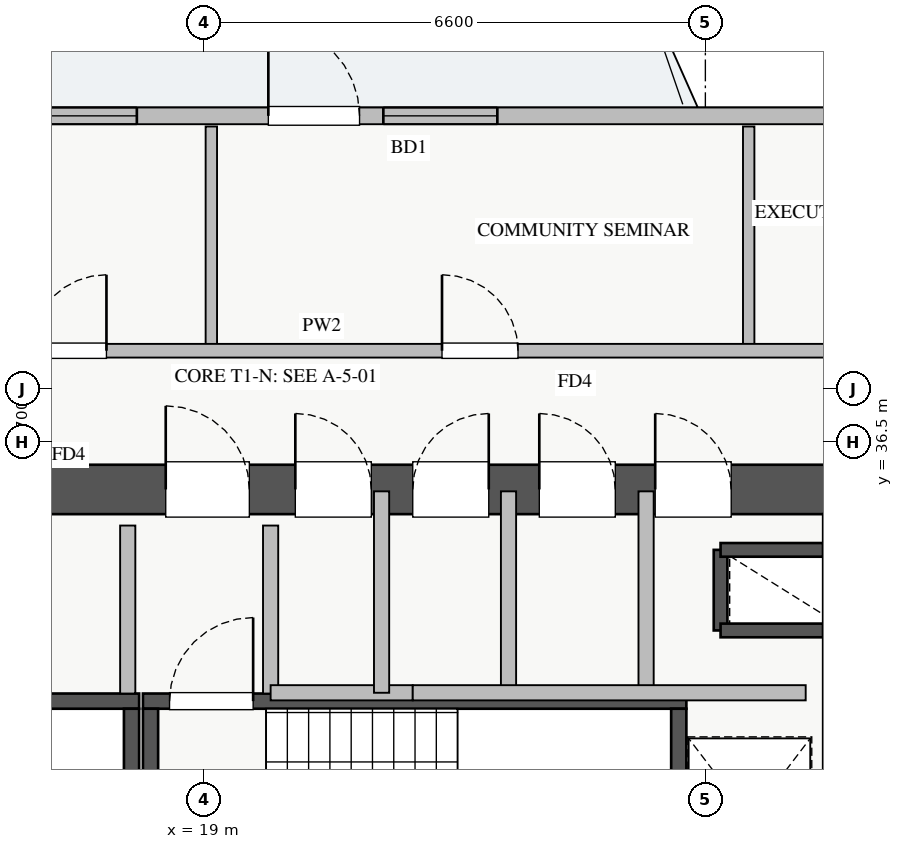
"""IFC4 building model, lengths in metres.
Left out: names, types, materials, properties, quantities, classifications, styles, units other than length and angle.
Written with IfcOpenShell. Run it as: python <this file> out.ifc"""

import sys

from ifc_helpers import new_model, si_unit, direction, frame, frame_2d, origin, place, context, subcontext, project, spatial, rectangle, extrude, source, transform, mapped, element, fill, save


model = new_model("IFC4")
c1 = context("Model", 3, precision=1e-05, world=origin(), true_north=direction((0.0, 1.0)))
c2 = subcontext(c1, "Body", "Model", "MODEL_VIEW")
j1 = project(units=[si_unit("LENGTHUNIT", "METRE"), si_unit("PLANEANGLEUNIT", "RADIAN")], contexts=[c1])
p1 = place(None, origin())
s1 = spatial("IfcSite", under=j1, at=p1, CompositionType="ELEMENT")
p2 = place(p1, origin())
s2 = spatial("IfcBuilding", under=s1, at=p2, CompositionType="ELEMENT")
p3 = place(p2, frame((0.0, 0.0, 143.75)))
s3 = spatial("IfcBuildingStorey", under=s2, at=p3, CompositionType="ELEMENT", Elevation=143.75)
p4 = place(p3, frame((25.8, 34.02, 0.0), z_axis=(0.0, 0.0, 1.0), x_axis=(0.0, 1.0, 0.0)))
e1 = element("IfcWall", 1, at=p4, inside=s3, PredefinedType="SHEAR", context=c2, shape_type="SweptSolid", body=[
    extrude(rectangle(XDim=1.06, YDim=0.18, at=frame_2d((0.53, 0.0))), origin(), (0.0, 0.0, 1.0), 3.07),
])
for number, where, z_axis, x_axis in (
    (2, (25.8, 35.08, 0.0), (0.0, 0.0, 1.0), (1.0, 0.0, 0.0)),
    (3, (25.8, 34.02, 0.0), (0.0, 0.0, 1.0), (1.0, 0.0, 0.0)),
):
    element("IfcWall", number, at=place(p3, frame(where, z_axis=z_axis, x_axis=x_axis)), inside=s3, PredefinedType="SHEAR", context=c2, shape_type="SweptSolid", body=[
        extrude(rectangle(XDim=1.35, YDim=0.18, at=frame_2d((0.675, 0.0))), origin(), (0.0, 0.0, 1.0), 3.07),
    ])
p5 = place(p3, frame((10.85, 33.09, 0.0), z_axis=(0.0, 0.0, 1.0), x_axis=(1.0, 0.0, 0.0)))
e4 = element("IfcWall", 4, at=p5, inside=s3, PredefinedType="SHEAR", context=c2, shape_type="SweptSolid", body=[
    extrude(rectangle(XDim=7.3, YDim=0.2, at=frame_2d((3.65, 0.0))), origin(), (0.0, 0.0, 1.0), 3.25),
])
p6 = place(p5, frame((0.35, 0.0, 0.0)))
e5 = element("IfcOpeningElement", 5, at=p6, cuts=e4, PredefinedType="OPENING", context=c2, shape_type="SweptSolid", body=[
    extrude(rectangle(XDim=1.1, YDim=2.05, at=frame_2d((0.55, 1.025))), frame((0.0, 0.11, 0.0), z_axis=(0.0, -1.0, 0.0), x_axis=(1.0, 0.0, 0.0)), (0.0, 0.0, 1.0), 0.22),
])
p7 = place(p3, frame((18.05, 30.05, 0.0), z_axis=(0.0, 0.0, 1.0), x_axis=(0.0, 1.0, 0.0)))
e6 = element("IfcWall", 6, at=p7, inside=s3, PredefinedType="SHEAR", context=c2, shape_type="SweptSolid", body=[
    extrude(rectangle(XDim=2.94, YDim=0.2, at=frame_2d((1.47, 0.0))), origin(), (0.0, 0.0, 1.0), 3.25),
])
p8 = place(p3, frame((18.2, 33.09, 0.0), z_axis=(0.0, 0.0, 1.0), x_axis=(1.0, 0.0, 0.0)))
e7 = element("IfcWall", 7, at=p8, inside=s3, PredefinedType="SHEAR", context=c2, shape_type="SweptSolid", body=[
    extrude(rectangle(XDim=7.15, YDim=0.2, at=frame_2d((3.575, 0.0))), origin(), (0.0, 0.0, 1.0), 3.25),
])
p9 = place(p8, frame((0.35, 0.0, 0.0)))
e8 = element("IfcOpeningElement", 8, at=p9, cuts=e7, PredefinedType="OPENING", context=c2, shape_type="SweptSolid", body=[
    extrude(rectangle(XDim=1.1, YDim=2.05, at=frame_2d((0.55, 1.025))), frame((0.0, 0.11, 0.0), z_axis=(0.0, -1.0, 0.0), x_axis=(1.0, 0.0, 0.0)), (0.0, 0.0, 1.0), 0.22),
])
for number, where, z_axis, x_axis in (
    (9, (18.3, 30.05, 0.0), (0.0, 0.0, 1.0), (0.0, 1.0, 0.0)),
    (10, (25.25, 30.05, 0.0), (0.0, 0.0, 1.0), (0.0, 1.0, 0.0)),
):
    element("IfcWall", number, at=place(p3, frame(where, z_axis=z_axis, x_axis=x_axis)), inside=s3, PredefinedType="SHEAR", context=c2, shape_type="SweptSolid", body=[
        extrude(rectangle(XDim=2.94, YDim=0.2, at=frame_2d((1.47, 0.0))), origin(), (0.0, 0.0, 1.0), 3.25),
    ])
p10 = place(p3, frame((10.2, 35.875, 0.0), z_axis=(0.0, 0.0, 1.0), x_axis=(1.0, 0.0, 0.0)))
e11 = element("IfcWall", 11, at=p10, inside=s3, PredefinedType="SHEAR", context=c2, shape_type="SweptSolid", body=[
    extrude(rectangle(XDim=17.6, YDim=0.65, at=frame_2d((8.8, 0.0))), origin(), (0.0, 0.0, 1.0), 3.25),
])
p11 = place(p10, frame((1.15, 0.0, 0.0)))
e12 = element("IfcOpeningElement", 12, at=p11, cuts=e11, PredefinedType="OPENING", context=c2, shape_type="SweptSolid", body=[
    extrude(rectangle(XDim=1.1, YDim=2.05, at=frame_2d((0.55, 1.025))), frame((0.0, 0.335, 0.0), z_axis=(0.0, -1.0, 0.0), x_axis=(1.0, 0.0, 0.0)), (0.0, 0.0, 1.0), 0.67),
])
p12 = place(p10, frame((8.3, 0.0, 0.0)))
e13 = element("IfcOpeningElement", 13, at=p12, cuts=e11, PredefinedType="OPENING", context=c2, shape_type="SweptSolid", body=[
    extrude(rectangle(XDim=1.1, YDim=2.05, at=frame_2d((0.55, 1.025))), frame((0.0, 0.335, 0.0), z_axis=(0.0, -1.0, 0.0), x_axis=(1.0, 0.0, 0.0)), (0.0, 0.0, 1.0), 0.67),
])
p13 = place(p10, frame((4.9, 0.0, 0.0)))
e14 = element("IfcOpeningElement", 14, at=p13, cuts=e11, PredefinedType="OPENING", context=c2, shape_type="SweptSolid", body=[
    extrude(rectangle(XDim=1.1, YDim=2.05, at=frame_2d((0.55, 1.025))), frame((0.0, 0.335, 0.0), z_axis=(0.0, -1.0, 0.0), x_axis=(1.0, 0.0, 0.0)), (0.0, 0.0, 1.0), 0.67),
])
p14 = place(p10, frame((14.74, 0.0, 0.0)))
e15 = element("IfcOpeningElement", 15, at=p14, cuts=e11, PredefinedType="OPENING", context=c2, shape_type="SweptSolid", body=[
    extrude(rectangle(XDim=1.0, YDim=2.05, at=frame_2d((0.5, 1.025))), frame((0.0, 0.335, 0.0), z_axis=(0.0, -1.0, 0.0), x_axis=(1.0, 0.0, 0.0)), (0.0, 0.0, 1.0), 0.67),
])
p15 = place(p10, frame((10.005, 0.0, 0.0)))
e16 = element("IfcOpeningElement", 16, at=p15, cuts=e11, PredefinedType="OPENING", context=c2, shape_type="SweptSolid", body=[
    extrude(rectangle(XDim=1.0, YDim=2.05, at=frame_2d((0.5, 1.025))), frame((0.0, 0.335, 0.0), z_axis=(0.0, -1.0, 0.0), x_axis=(1.0, 0.0, 0.0)), (0.0, 0.0, 1.0), 0.67),
])
p16 = place(p10, frame((11.55, 0.0, 0.0)))
e17 = element("IfcOpeningElement", 17, at=p16, cuts=e11, PredefinedType="OPENING", context=c2, shape_type="SweptSolid", body=[
    extrude(rectangle(XDim=1.0, YDim=2.05, at=frame_2d((0.5, 1.025))), frame((0.0, 0.335, 0.0), z_axis=(0.0, -1.0, 0.0), x_axis=(1.0, 0.0, 0.0)), (0.0, 0.0, 1.0), 0.67),
])
p17 = place(p10, frame((13.215, 0.0, 0.0)))
e18 = element("IfcOpeningElement", 18, at=p17, cuts=e11, PredefinedType="OPENING", context=c2, shape_type="SweptSolid", body=[
    extrude(rectangle(XDim=1.0, YDim=2.05, at=frame_2d((0.5, 1.025))), frame((0.0, 0.335, 0.0), z_axis=(0.0, -1.0, 0.0), x_axis=(1.0, 0.0, 0.0)), (0.0, 0.0, 1.0), 0.67),
])
p18 = place(p3, frame((6.55, 40.79, 0.0), z_axis=(0.0, 0.0, 1.0), x_axis=(1.0, 0.0, 0.0)))
e19 = element("IfcWall", 19, at=p18, inside=s3, PredefinedType="STANDARD", context=c2, shape_type="SweptSolid", body=[
    extrude(rectangle(XDim=24.9, YDim=0.22, at=frame_2d((12.45, 0.0))), origin(), (0.0, 0.0, 1.0), 2.61),
])
p19 = place(p18, frame((13.3, 0.0, 0.0)))
e20 = element("IfcOpeningElement", 20, at=p19, cuts=e19, PredefinedType="OPENING", context=c2, shape_type="SweptSolid", body=[
    extrude(rectangle(XDim=1.2, YDim=2.1, at=frame_2d((0.6, 1.05))), frame((0.0, 0.12, 0.0), z_axis=(0.0, -1.0, 0.0), x_axis=(1.0, 0.0, 0.0)), (0.0, 0.0, 1.0), 0.24),
])
p20 = place(p18, frame((0.357, 0.0, 0.9)))
e21 = element("IfcOpeningElement", 21, at=p20, cuts=e19, PredefinedType="OPENING", context=c2, shape_type="SweptSolid", body=[
    extrude(rectangle(XDim=1.5, YDim=1.5, at=frame_2d((0.75, 0.75))), frame((0.0, 0.12, 0.0), z_axis=(0.0, -1.0, 0.0), x_axis=(1.0, 0.0, 0.0)), (0.0, 0.0, 1.0), 0.24),
])
p21 = place(p18, frame((9.77, 0.0, 0.9)))
e22 = element("IfcOpeningElement", 22, at=p21, cuts=e19, PredefinedType="OPENING", context=c2, shape_type="SweptSolid", body=[
    extrude(rectangle(XDim=1.8, YDim=1.5, at=frame_2d((0.9, 0.75))), frame((0.0, 0.12, 0.0), z_axis=(0.0, -1.0, 0.0), x_axis=(1.0, 0.0, 0.0)), (0.0, 0.0, 1.0), 0.24),
])
p22 = place(p18, frame((14.813, 0.0, 0.9)))
e23 = element("IfcOpeningElement", 23, at=p22, cuts=e19, PredefinedType="OPENING", context=c2, shape_type="SweptSolid", body=[
    extrude(rectangle(XDim=1.5, YDim=1.45, at=frame_2d((0.75, 0.725))), frame((0.0, 0.12, 0.0), z_axis=(0.0, -1.0, 0.0), x_axis=(1.0, 0.0, 0.0)), (0.0, 0.0, 1.0), 0.24),
])
p23 = place(p18, frame((20.738, 0.0, 0.9)))
e24 = element("IfcOpeningElement", 24, at=p23, cuts=e19, PredefinedType="OPENING", context=c2, shape_type="SweptSolid", body=[
    extrude(rectangle(XDim=2.1, YDim=1.48, at=frame_2d((1.05, 0.74))), frame((0.0, 0.12, 0.0), z_axis=(0.0, -1.0, 0.0), x_axis=(1.0, 0.0, 0.0)), (0.0, 0.0, 1.0), 0.24),
])
p24 = place(p18, frame((4.136, 0.0, 0.9)))
e25 = element("IfcOpeningElement", 25, at=p24, cuts=e19, PredefinedType="OPENING", context=c2, shape_type="SweptSolid", body=[
    extrude(rectangle(XDim=2.4, YDim=1.5, at=frame_2d((1.2, 0.75))), frame((0.0, 0.12, 0.0), z_axis=(0.0, -1.0, 0.0), x_axis=(1.0, 0.0, 0.0)), (0.0, 0.0, 1.0), 0.24),
])
for number, where, z_axis, x_axis in (
    (26, (18.0, 33.19, 0.0), (0.0, 0.0, 1.0), (0.0, 1.0, 0.0)),
    (27, (19.88, 33.19, 0.0), (0.0, 0.0, 1.0), (0.0, 1.0, 0.0)),
):
    element("IfcWall", number, at=place(p3, frame(where, z_axis=z_axis, x_axis=x_axis)), inside=s3, PredefinedType="PARTITIONING", context=c2, shape_type="SweptSolid", body=[
        extrude(rectangle(XDim=2.21, YDim=0.2, at=frame_2d((1.105, 0.0))), origin(), (0.0, 0.0, 1.0), 3.07),
    ])
p25 = place(p3, frame((24.82, 33.2, 0.0), z_axis=(0.0, 0.0, 1.0), x_axis=(0.0, 1.0, 0.0)))
e28 = element("IfcWall", 28, at=p25, inside=s3, PredefinedType="PARTITIONING", context=c2, shape_type="SweptSolid", body=[
    extrude(rectangle(XDim=2.65, YDim=0.2, at=frame_2d((1.325, 0.0))), origin(), (0.0, 0.0, 1.0), 3.07),
])
p26 = place(p3, frame((19.88, 33.2, 0.0), z_axis=(0.0, 0.0, 1.0), x_axis=(1.0, 0.0, 0.0)))
e29 = element("IfcWall", 29, at=p26, inside=s3, PredefinedType="PARTITIONING", context=c2, shape_type="SweptSolid", body=[
    extrude(rectangle(XDim=1.87, YDim=0.2, at=frame_2d((0.935, 0.0))), origin(), (0.0, 0.0, 1.0), 3.07),
])
for number, where, z_axis, x_axis in (
    (30, (21.34, 33.2, 0.0), (0.0, 0.0, 1.0), (0.0, 1.0, 0.0)),
    (31, (23.01, 33.2, 0.0), (0.0, 0.0, 1.0), (0.0, 1.0, 0.0)),
):
    element("IfcWall", number, at=place(p3, frame(where, z_axis=z_axis, x_axis=x_axis)), inside=s3, PredefinedType="PARTITIONING", context=c2, shape_type="SweptSolid", body=[
        extrude(rectangle(XDim=2.65, YDim=0.2, at=frame_2d((1.325, 0.0))), origin(), (0.0, 0.0, 1.0), 3.07),
    ])
p27 = place(p3, frame((21.75, 33.2, 0.0), z_axis=(0.0, 0.0, 1.0), x_axis=(1.0, 0.0, 0.0)))
e32 = element("IfcWall", 32, at=p27, inside=s3, PredefinedType="PARTITIONING", context=c2, shape_type="SweptSolid", body=[
    extrude(rectangle(XDim=5.17, YDim=0.2, at=frame_2d((2.585, 0.0))), origin(), (0.0, 0.0, 1.0), 3.07),
])
p28 = place(p3, frame((19.1, 37.7, 0.0), z_axis=(0.0, 0.0, 1.0), x_axis=(0.0, 1.0, 0.0)))
e33 = element("IfcWall", 33, at=p28, inside=s3, PredefinedType="PARTITIONING", context=c2, shape_type="SweptSolid", body=[
    extrude(rectangle(XDim=2.95, YDim=0.15, at=frame_2d((1.475, 0.0))), origin(), (0.0, 0.0, 1.0), 2.865),
])
p29 = place(p3, frame((26.17, 37.7, 0.0), z_axis=(0.0, 0.0, 1.0), x_axis=(0.0, 1.0, 0.0)))
e34 = element("IfcWall", 34, at=p29, inside=s3, PredefinedType="PARTITIONING", context=c2, shape_type="SweptSolid", body=[
    extrude(rectangle(XDim=2.95, YDim=0.15, at=frame_2d((1.475, 0.0))), origin(), (0.0, 0.0, 1.0), 3.07),
])
p30 = place(p3, frame((8.75, 37.7, 0.0), z_axis=(0.0, 0.0, 1.0), x_axis=(1.0, 0.0, 0.0)))
e35 = element("IfcWall", 35, at=p30, inside=s3, PredefinedType="PARTITIONING", context=c2, shape_type="SweptSolid", body=[
    extrude(rectangle(XDim=23.61, YDim=0.18, at=frame_2d((11.805, 0.0))), origin(), (0.0, 0.0, 1.0), 3.07),
])
p31 = place(p30, frame((2.795, 0.0, 0.0)))
e36 = element("IfcOpeningElement", 36, at=p31, cuts=e35, PredefinedType="OPENING", context=c2, shape_type="SweptSolid", body=[
    extrude(rectangle(XDim=1.0, YDim=2.05, at=frame_2d((0.5, 1.025))), frame((0.0, 0.1, 0.0), z_axis=(0.0, -1.0, 0.0), x_axis=(1.0, 0.0, 0.0)), (0.0, 0.0, 1.0), 0.2),
])
p32 = place(p30, frame((7.97, 0.0, 0.0)))
e37 = element("IfcOpeningElement", 37, at=p32, cuts=e35, PredefinedType="OPENING", context=c2, shape_type="SweptSolid", body=[
    extrude(rectangle(XDim=1.0, YDim=2.05, at=frame_2d((0.5, 1.025))), frame((0.0, 0.1, 0.0), z_axis=(0.0, -1.0, 0.0), x_axis=(1.0, 0.0, 0.0)), (0.0, 0.0, 1.0), 0.2),
])
p33 = place(p30, frame((13.385, 0.0, 0.0)))
e38 = element("IfcOpeningElement", 38, at=p33, cuts=e35, PredefinedType="OPENING", context=c2, shape_type="SweptSolid", body=[
    extrude(rectangle(XDim=1.0, YDim=2.05, at=frame_2d((0.5, 1.025))), frame((0.0, 0.1, 0.0), z_axis=(0.0, -1.0, 0.0), x_axis=(1.0, 0.0, 0.0)), (0.0, 0.0, 1.0), 0.2),
])
p34 = place(p30, frame((19.825, 0.0, 0.0)))
e39 = element("IfcOpeningElement", 39, at=p34, cuts=e35, PredefinedType="OPENING", context=c2, shape_type="SweptSolid", body=[
    extrude(rectangle(XDim=1.0, YDim=2.05, at=frame_2d((0.5, 1.025))), frame((0.0, 0.1, 0.0), z_axis=(0.0, -1.0, 0.0), x_axis=(1.0, 0.0, 0.0)), (0.0, 0.0, 1.0), 0.2),
])
m1 = source(origin(), c2, "Body", "SweptSolid", [
    extrude(rectangle(XDim=1.2, YDim=2.1, at=frame_2d((0.6, 1.05))), frame((0.0, 0.025, 0.0), z_axis=(0.0, -1.0, 0.0), x_axis=(1.0, 0.0, 0.0)), (0.0, 0.0, 1.0), 0.05),
])
p35 = place(p19, origin())
e40 = element("IfcDoor", 40, at=p35, inside=s3, OperationType="SINGLE_SWING_LEFT", PredefinedType="DOOR", context=c2, shape_type="MappedRepresentation", body=[
    mapped(m1, transform((0.0, 0.0, 0.0), x_axis=(1.0, 0.0, 0.0), y_axis=(0.0, 1.0, 0.0), z_axis=(0.0, 0.0, 1.0), scale=1.0)),
])
fill(e20, e40)
m2 = source(origin(), c2, "Body", "SweptSolid", [
    extrude(rectangle(XDim=1.8, YDim=1.5, at=frame_2d((0.9, 0.75))), frame((0.0, 0.03, 0.0), z_axis=(0.0, -1.0, 0.0), x_axis=(1.0, 0.0, 0.0)), (0.0, 0.0, 1.0), 0.06),
])
p36 = place(p21, origin())
e41 = element("IfcWindow", 41, at=p36, inside=s3, PartitioningType="DOUBLE_PANEL_VERTICAL", PredefinedType="WINDOW", context=c2, shape_type="MappedRepresentation", body=[
    mapped(m2, transform((0.0, 0.0, 0.0), x_axis=(1.0, 0.0, 0.0), y_axis=(0.0, 1.0, 0.0), z_axis=(0.0, 0.0, 1.0), scale=1.0)),
])
fill(e22, e41)
m3 = source(origin(), c2, "Body", "SweptSolid", [
    extrude(rectangle(XDim=1.5, YDim=1.45, at=frame_2d((0.75, 0.725))), frame((0.0, 0.03, 0.0), z_axis=(0.0, -1.0, 0.0), x_axis=(1.0, 0.0, 0.0)), (0.0, 0.0, 1.0), 0.06),
])
p37 = place(p22, origin())
e42 = element("IfcWindow", 42, at=p37, inside=s3, PartitioningType="DOUBLE_PANEL_VERTICAL", PredefinedType="WINDOW", context=c2, shape_type="MappedRepresentation", body=[
    mapped(m3, transform((0.0, 0.0, 0.0), x_axis=(1.0, 0.0, 0.0), y_axis=(0.0, 1.0, 0.0), z_axis=(0.0, 0.0, 1.0), scale=1.0)),
])
fill(e23, e42)
m4 = source(origin(), c2, "Body", "SweptSolid", [
    extrude(rectangle(XDim=1.1, YDim=2.05, at=frame_2d((0.55, 1.025))), frame((0.0, 0.025, 0.0), z_axis=(0.0, -1.0, 0.0), x_axis=(1.0, 0.0, 0.0)), (0.0, 0.0, 1.0), 0.05),
])
p38 = place(p12, origin())
e43 = element("IfcDoor", 43, at=p38, inside=s3, OperationType="SINGLE_SWING_LEFT", PredefinedType="DOOR", context=c2, shape_type="MappedRepresentation", body=[
    mapped(m4, transform((0.0, 0.0, 0.0), x_axis=(1.0, 0.0, 0.0), y_axis=(0.0, 1.0, 0.0), z_axis=(0.0, 0.0, 1.0), scale=1.0)),
])
fill(e13, e43)
p39 = place(p9, origin())
e44 = element("IfcDoor", 44, at=p39, inside=s3, OperationType="SINGLE_SWING_RIGHT", PredefinedType="DOOR", context=c2, shape_type="MappedRepresentation", body=[
    mapped(m4, transform((0.0, 0.0, 0.0), x_axis=(1.0, 0.0, 0.0), y_axis=(0.0, 1.0, 0.0), z_axis=(0.0, 0.0, 1.0), scale=1.0)),
])
fill(e8, e44)
m5 = source(origin(), c2, "Body", "SweptSolid", [
    extrude(rectangle(XDim=1.0, YDim=2.05, at=frame_2d((0.5, 1.025))), frame((0.0, 0.025, 0.0), z_axis=(0.0, -1.0, 0.0), x_axis=(1.0, 0.0, 0.0)), (0.0, 0.0, 1.0), 0.05),
])
p40 = place(p14, origin())
e45 = element("IfcDoor", 45, at=p40, inside=s3, OperationType="SINGLE_SWING_LEFT", PredefinedType="DOOR", context=c2, shape_type="MappedRepresentation", body=[
    mapped(m5, transform((0.0, 0.0, 0.0), x_axis=(1.0, 0.0, 0.0), y_axis=(0.0, 1.0, 0.0), z_axis=(0.0, 0.0, 1.0), scale=1.0)),
])
fill(e15, e45)
p41 = place(p15, origin())
e46 = element("IfcDoor", 46, at=p41, inside=s3, OperationType="SINGLE_SWING_LEFT", PredefinedType="DOOR", context=c2, shape_type="MappedRepresentation", body=[
    mapped(m5, transform((0.0, 0.0, 0.0), x_axis=(1.0, 0.0, 0.0), y_axis=(0.0, 1.0, 0.0), z_axis=(0.0, 0.0, 1.0), scale=1.0)),
])
fill(e16, e46)
p42 = place(p16, origin())
e47 = element("IfcDoor", 47, at=p42, inside=s3, OperationType="SINGLE_SWING_RIGHT", PredefinedType="DOOR", context=c2, shape_type="MappedRepresentation", body=[
    mapped(m5, transform((0.0, 0.0, 0.0), x_axis=(1.0, 0.0, 0.0), y_axis=(0.0, 1.0, 0.0), z_axis=(0.0, 0.0, 1.0), scale=1.0)),
])
fill(e17, e47)
p43 = place(p17, origin())
e48 = element("IfcDoor", 48, at=p43, inside=s3, OperationType="SINGLE_SWING_LEFT", PredefinedType="DOOR", context=c2, shape_type="MappedRepresentation", body=[
    mapped(m5, transform((0.0, 0.0, 0.0), x_axis=(1.0, 0.0, 0.0), y_axis=(0.0, 1.0, 0.0), z_axis=(0.0, 0.0, 1.0), scale=1.0)),
])
fill(e18, e48)
p44 = place(p32, origin())
e49 = element("IfcDoor", 49, at=p44, inside=s3, OperationType="SINGLE_SWING_RIGHT", PredefinedType="DOOR", context=c2, shape_type="MappedRepresentation", body=[
    mapped(m5, transform((0.0, 0.0, 0.0), x_axis=(1.0, 0.0, 0.0), y_axis=(0.0, 1.0, 0.0), z_axis=(0.0, 0.0, 1.0), scale=1.0)),
])
fill(e37, e49)
p45 = place(p33, origin())
e50 = element("IfcDoor", 50, at=p45, inside=s3, OperationType="SINGLE_SWING_LEFT", PredefinedType="DOOR", context=c2, shape_type="MappedRepresentation", body=[
    mapped(m5, transform((0.0, 0.0, 0.0), x_axis=(1.0, 0.0, 0.0), y_axis=(0.0, 1.0, 0.0), z_axis=(0.0, 0.0, 1.0), scale=1.0)),
])
fill(e38, e50)
save(model, sys.argv[1])
